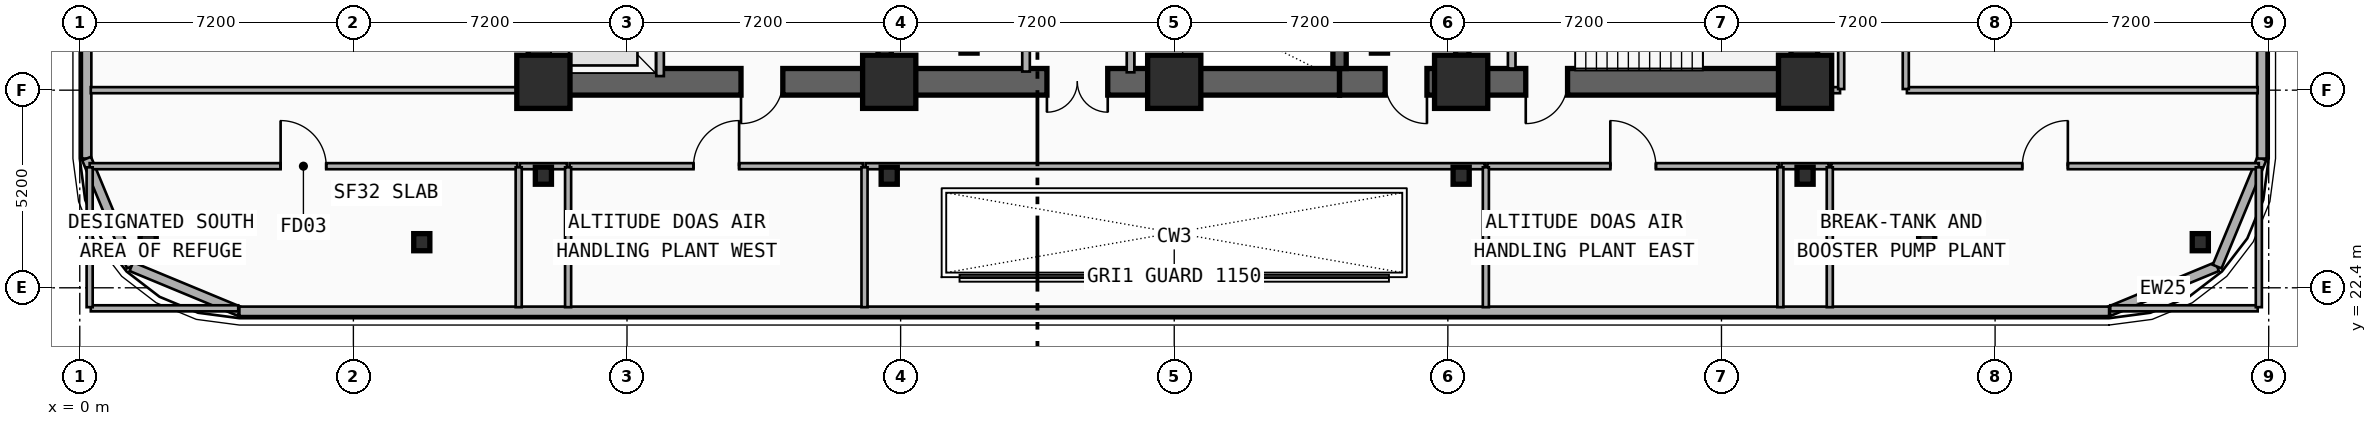
"""IFC4 building model, lengths in metres.
Left out: names, types, materials, properties, quantities, classifications, styles, units other than length and angle.
Written with IfcOpenShell. Run it as: python <this file> out.ifc"""

import sys

from ifc_helpers import new_model, si_unit, direction, frame, frame_2d, origin, origin_2d, place, context, subcontext, project, spatial, rectangle, i_section, extrude, element, fill, save


model = new_model("IFC4")
c1 = context("Model", 3, precision=1e-05, world=origin(), true_north=direction((0.0, 1.0)))
c2 = subcontext(c1, "Body", "Model", "MODEL_VIEW")
j1 = project(units=[si_unit("LENGTHUNIT", "METRE"), si_unit("PLANEANGLEUNIT", "RADIAN")], contexts=[c1])
p1 = place(None, origin())
s1 = spatial("IfcSite", under=j1, at=p1, CompositionType="ELEMENT")
p2 = place(p1, origin())
s2 = spatial("IfcBuilding", under=s1, at=p2, CompositionType="ELEMENT")
p3 = place(p2, frame((0.0, 0.0, 74.5)))
s3 = spatial("IfcBuildingStorey", under=s2, at=p3, CompositionType="ELEMENT", Elevation=74.5)
p4 = place(p3, frame((21.18, 27.82, 0.0), z_axis=(0.0, 0.0, 1.0), x_axis=(-1.0, 0.0, 0.0)))
e1 = element("IfcWall", 1, at=p4, inside=s3, PredefinedType="SHEAR", context=c2, shape_type="SweptSolid", body=[
    extrude(rectangle(XDim=9.03, YDim=0.7, at=frame_2d((4.515, 0.0))), origin(), (0.0, 0.0, 1.0), 4.8),
])
p5 = place(p4, frame((2.68, 0.0, 0.0)))
e2 = element("IfcOpeningElement", 2, at=p5, cuts=e1, PredefinedType="OPENING", context=c2, shape_type="SweptSolid", body=[
    extrude(rectangle(XDim=1.1, YDim=2.15, at=frame_2d((0.55, 1.075))), frame((0.0, 0.36, 0.0), z_axis=(0.0, -1.0, 0.0), x_axis=(1.0, 0.0, 0.0)), (0.0, 0.0, 1.0), 0.72),
])
p6 = place(p3, frame((33.15, 27.82, 0.0), z_axis=(0.0, 0.0, 1.0), x_axis=(-1.0, 0.0, 0.0)))
e3 = element("IfcWall", 3, at=p6, inside=s3, PredefinedType="SHEAR", context=c2, shape_type="SweptSolid", body=[
    extrude(rectangle(XDim=11.97, YDim=0.7, at=frame_2d((5.985, 0.0))), origin(), (0.0, 0.0, 1.0), 4.8),
])
p7 = place(p6, frame((6.1, 0.0, 0.0)))
e4 = element("IfcOpeningElement", 4, at=p7, cuts=e3, PredefinedType="OPENING", context=c2, shape_type="SweptSolid", body=[
    extrude(rectangle(XDim=1.6, YDim=2.2, at=frame_2d((0.8, 1.1))), frame((0.0, 0.36, 0.0), z_axis=(0.0, -1.0, 0.0), x_axis=(1.0, 0.0, 0.0)), (0.0, 0.0, 1.0), 0.72),
])
p8 = place(p3, frame((45.38, 27.82, 0.0), z_axis=(0.0, 0.0, 1.0), x_axis=(-1.0, 0.0, 0.0)))
e5 = element("IfcWall", 5, at=p8, inside=s3, PredefinedType="SHEAR", context=c2, shape_type="SweptSolid", body=[
    extrude(rectangle(XDim=12.23, YDim=0.7, at=frame_2d((6.115, 0.0))), origin(), (0.0, 0.0, 1.0), 4.8),
])
p9 = place(p8, frame((9.93, 0.0, 0.0)))
e6 = element("IfcOpeningElement", 6, at=p9, cuts=e5, PredefinedType="OPENING", context=c2, shape_type="SweptSolid", body=[
    extrude(rectangle(XDim=1.1, YDim=2.15, at=frame_2d((0.55, 1.075))), frame((0.0, 0.36, 0.0), z_axis=(0.0, -1.0, 0.0), x_axis=(1.0, 0.0, 0.0)), (0.0, 0.0, 1.0), 0.72),
])
p10 = place(p8, frame((6.23, 0.0, 0.0)))
e7 = element("IfcOpeningElement", 7, at=p10, cuts=e5, PredefinedType="OPENING", context=c2, shape_type="SweptSolid", body=[
    extrude(rectangle(XDim=1.1, YDim=2.15, at=frame_2d((0.55, 1.075))), frame((0.0, 0.36, 0.0), z_axis=(0.0, -1.0, 0.0), x_axis=(1.0, 0.0, 0.0)), (0.0, 0.0, 1.0), 0.72),
])
for number, where, z_axis, x_axis in (
    (8, (12.15, 28.17, 0.0), (0.0, 0.0, 1.0), (0.0, 1.0, 0.0)),
    (9, (45.38, 28.17, 0.0), (0.0, 0.0, 1.0), (0.0, 1.0, 0.0)),
):
    element("IfcWall", number, at=place(p3, frame(where, z_axis=z_axis, x_axis=x_axis)), inside=s3, PredefinedType="SHEAR", context=c2, shape_type="SweptSolid", body=[
        extrude(rectangle(XDim=8.53, YDim=0.7, at=frame_2d((4.265, 0.0))), origin(), (0.0, 0.0, 1.0), 4.8),
    ])
for number, where, z_axis, x_axis in (
    (10, (21.18, 28.17, 0.0), (0.0, 0.0, 1.0), (0.0, 1.0, 0.0)),
    (11, (33.15, 28.17, 0.0), (0.0, 0.0, 1.0), (0.0, 1.0, 0.0)),
):
    element("IfcWall", number, at=place(p3, frame(where, z_axis=z_axis, x_axis=x_axis)), inside=s3, PredefinedType="SHEAR", context=c2, shape_type="SweptSolid", body=[
        extrude(rectangle(XDim=8.53, YDim=0.35, at=frame_2d((4.265, 0.0))), origin(), (0.0, 0.0, 1.0), 4.8),
    ])
p11 = place(p3, frame((36.38, 28.17, 0.0), z_axis=(0.0, 0.0, 1.0), x_axis=(0.0, 1.0, 0.0)))
e12 = element("IfcWall", 12, at=p11, inside=s3, PredefinedType="SHEAR", context=c2, shape_type="SweptSolid", body=[
    extrude(rectangle(XDim=8.53, YDim=0.35, at=frame_2d((4.265, 0.0))), origin(), (0.0, 0.0, 1.0), 4.8),
])
p12 = place(p11, frame((3.61, 0.0, 0.0)))
e13 = element("IfcOpeningElement", 13, at=p12, cuts=e12, PredefinedType="OPENING", context=c2, shape_type="SweptSolid", body=[
    extrude(rectangle(XDim=1.1, YDim=2.15, at=frame_2d((0.55, 1.075))), frame((0.0, 0.185, 0.0), z_axis=(0.0, -1.0, 0.0), x_axis=(1.0, 0.0, 0.0)), (0.0, 0.0, 1.0), 0.37),
])
for number, where, z_axis, x_axis in (
    (14, (23.4, 28.8, 0.0), (0.0, 0.0, 1.0), (1.0, 0.0, 0.0)),
    (15, (34.2, 28.8, 0.0), (0.0, 0.0, 1.0), (1.0, 0.0, 0.0)),
):
    element("IfcColumn", number, at=place(p3, frame(where, z_axis=z_axis, x_axis=x_axis)), inside=s3, PredefinedType="COLUMN", context=c2, shape_type="SweptSolid", body=[
        extrude(i_section(OverallWidth=0.424, OverallDepth=0.45, WebThickness=0.041, FlangeThickness=0.065, FilletRadius=0.015, at=origin_2d()), origin(), (0.0, 0.0, 1.0), 4.8),
    ])
for number, where, z_axis, x_axis in (
    (16, (12.2, 27.82, 0.0), (0.0, 0.0, 1.0), (1.0, 0.0, 0.0)),
    (17, (21.3, 27.82, 0.0), (0.0, 0.0, 1.0), (1.0, 0.0, 0.0)),
    (18, (28.8, 27.82, 0.0), (0.0, 0.0, 1.0), (1.0, 0.0, 0.0)),
    (19, (36.35, 27.82, 0.0), (0.0, 0.0, 1.0), (1.0, 0.0, 0.0)),
    (20, (45.4, 27.82, 0.0), (0.0, 0.0, 1.0), (1.0, 0.0, 0.0)),
):
    element("IfcColumn", number, at=place(p3, frame(where, z_axis=z_axis, x_axis=x_axis)), inside=s3, PredefinedType="COLUMN", context=c2, shape_type="SweptSolid", body=[
        extrude(rectangle(XDim=1.4, YDim=1.4, at=origin_2d()), origin(), (0.0, 0.0, 1.0), 4.8),
    ])
for number, where, z_axis, x_axis in (
    (21, (12.2, 25.35, 0.0), (0.0, 0.0, 1.0), (1.0, 0.0, 0.0)),
    (22, (21.3, 25.35, 0.0), (0.0, 0.0, 1.0), (1.0, 0.0, 0.0)),
    (23, (36.35, 25.35, 0.0), (0.0, 0.0, 1.0), (1.0, 0.0, 0.0)),
    (24, (45.4, 25.35, 0.0), (0.0, 0.0, 1.0), (1.0, 0.0, 0.0)),
    (25, (9.0, 23.6, 0.0), (0.0, 0.0, 1.0), (1.0, 0.0, 0.0)),
    (26, (48.6, 23.6, 0.0), (0.0, 0.0, 1.0), (1.0, 0.0, 0.0)),
    (27, (1.8, 23.6, 0.0), (0.0, 0.0, 1.0), (1.0, 0.0, 0.0)),
    (28, (55.8, 23.6, 0.0), (0.0, 0.0, 1.0), (1.0, 0.0, 0.0)),
):
    element("IfcColumn", number, at=place(p3, frame(where, z_axis=z_axis, x_axis=x_axis)), inside=s3, PredefinedType="COLUMN", context=c2, shape_type="SweptSolid", body=[
        extrude(i_section(OverallWidth=0.424, OverallDepth=0.45, WebThickness=0.041, FlangeThickness=0.065, FilletRadius=0.015, at=origin_2d()), origin(), (0.0, 0.0, 1.0), 4.8),
    ])
p13 = place(p3, frame((56.243, 22.958, 0.0), z_axis=(0.0, 0.0, 1.0), x_axis=(-0.923882414032, -0.382676475685, 0.0)))
e29 = element("IfcWall", 29, at=p13, inside=s3, PredefinedType="SOLIDWALL", context=c2, shape_type="SweptSolid", body=[
    extrude(rectangle(XDim=3.077, YDim=0.25, at=frame_2d((1.539, 0.0))), origin(), (0.0, 0.0, 1.0), 3.96),
])
p14 = place(p3, frame((57.42, 25.8, 0.0), z_axis=(0.0, 0.0, 1.0), x_axis=(-0.382636798336, -0.92389884758, 0.0)))
e30 = element("IfcWall", 30, at=p14, inside=s3, PredefinedType="SOLIDWALL", context=c2, shape_type="SweptSolid", body=[
    extrude(rectangle(XDim=3.077, YDim=0.25, at=frame_2d((1.538, 0.0))), origin(), (0.0, 0.0, 1.0), 4.48),
])
for number, where, z_axis, x_axis in (
    (31, (57.42, 41.0, 0.0), (0.0, 0.0, 1.0), (0.0, -1.0, 0.0)),
    (32, (0.18, 25.8, 0.0), (0.0, 0.0, 1.0), (0.0, 1.0, 0.0)),
):
    element("IfcWall", number, at=place(p3, frame(where, z_axis=z_axis, x_axis=x_axis)), inside=s3, PredefinedType="SOLIDWALL", context=c2, shape_type="SweptSolid", body=[
        extrude(rectangle(XDim=15.2, YDim=0.25, at=frame_2d((7.6, 0.0))), origin(), (0.0, 0.0, 1.0), 4.48),
    ])
p15 = place(p3, frame((1.357, 22.958, 0.0), z_axis=(0.0, 0.0, 1.0), x_axis=(-0.382704529509, 0.923870793506, 0.0)))
e33 = element("IfcWall", 33, at=p15, inside=s3, PredefinedType="SOLIDWALL", context=c2, shape_type="SweptSolid", body=[
    extrude(rectangle(XDim=3.077, YDim=0.25, at=frame_2d((1.538, 0.0))), origin(), (0.0, 0.0, 1.0), 4.48),
])
p16 = place(p3, frame((4.2, 21.78, 0.0), z_axis=(0.0, 0.0, 1.0), x_axis=(-0.923870793506, 0.382704529509, 0.0)))
e34 = element("IfcWall", 34, at=p16, inside=s3, PredefinedType="SOLIDWALL", context=c2, shape_type="SweptSolid", body=[
    extrude(rectangle(XDim=3.077, YDim=0.25, at=frame_2d((1.538, 0.0))), origin(), (0.0, 0.0, 1.0), 3.96),
])
p17 = place(p3, frame((53.4, 21.78, 0.0), z_axis=(0.0, 0.0, 1.0), x_axis=(-1.0, 0.0, 0.0)))
e35 = element("IfcWall", 35, at=p17, inside=s3, PredefinedType="SOLIDWALL", context=c2, shape_type="SweptSolid", body=[
    extrude(rectangle(XDim=49.2, YDim=0.25, at=frame_2d((24.6, 0.0))), origin(), (0.0, 0.0, 1.0), 4.07),
])
p18 = place(p3, frame((15.27, 27.97, 0.0), z_axis=(0.0, 0.0, 1.0), x_axis=(0.0, 1.0, 0.0)))
e36 = element("IfcWall", 36, at=p18, inside=s3, PredefinedType="PARTITIONING", context=c2, shape_type="SweptSolid", body=[
    extrude(rectangle(XDim=2.96, YDim=0.2, at=frame_2d((1.48, 0.0))), origin(), (0.0, 0.0, 1.0), 3.452),
])
p19 = place(p18, frame((0.93, 0.0, 0.0)))
e37 = element("IfcOpeningElement", 37, at=p19, cuts=e36, PredefinedType="OPENING", context=c2, shape_type="SweptSolid", body=[
    extrude(rectangle(XDim=1.1, YDim=2.15, at=frame_2d((0.55, 1.075))), frame((0.0, 0.11, 0.0), z_axis=(0.0, -1.0, 0.0), x_axis=(1.0, 0.0, 0.0)), (0.0, 0.0, 1.0), 0.22),
])
p20 = place(p3, frame((27.65, 28.07, 0.0), z_axis=(0.0, 0.0, 1.0), x_axis=(0.0, 1.0, 0.0)))
e38 = element("IfcWall", 38, at=p20, inside=s3, PredefinedType="PARTITIONING", context=c2, shape_type="SweptSolid", body=[
    extrude(rectangle(XDim=2.58, YDim=0.2, at=frame_2d((1.29, 0.0))), origin(), (0.0, 0.0, 1.0), 3.452),
])
p21 = place(p3, frame((37.68, 28.17, 0.0), z_axis=(0.0, 0.0, 1.0), x_axis=(0.0, 1.0, 0.0)))
e39 = element("IfcWall", 39, at=p21, inside=s3, PredefinedType="PARTITIONING", context=c2, shape_type="SweptSolid", body=[
    extrude(rectangle(XDim=3.08, YDim=0.2, at=frame_2d((1.54, 0.0))), origin(), (0.0, 0.0, 1.0), 3.86),
])
p22 = place(p3, frame((24.9, 28.09, 0.0), z_axis=(0.0, 0.0, 1.0), x_axis=(0.0, 1.0, 0.0)))
e40 = element("IfcWall", 40, at=p22, inside=s3, PredefinedType="PARTITIONING", context=c2, shape_type="SweptSolid", body=[
    extrude(rectangle(XDim=2.82, YDim=0.2, at=frame_2d((1.41, 0.0))), origin(), (0.0, 0.0, 1.0), 3.86),
])
p23 = place(p22, frame((1.201, 0.0, 0.0)))
e41 = element("IfcOpeningElement", 41, at=p23, cuts=e40, PredefinedType="OPENING", context=c2, shape_type="SweptSolid", body=[
    extrude(rectangle(XDim=1.2, YDim=2.15, at=frame_2d((0.6, 1.075))), frame((0.0, 0.11, 0.0), z_axis=(0.0, -1.0, 0.0), x_axis=(1.0, 0.0, 0.0)), (0.0, 0.0, 1.0), 0.22),
])
p24 = place(p3, frame((0.26, 25.6, 0.0), z_axis=(0.0, 0.0, 1.0), x_axis=(1.0, 0.0, 0.0)))
e42 = element("IfcWall", 42, at=p24, inside=s3, PredefinedType="PARTITIONING", context=c2, shape_type="SweptSolid", body=[
    extrude(rectangle(XDim=11.25, YDim=0.16, at=frame_2d((5.625, 0.0))), origin(), (0.0, 0.0, 1.0), 3.81),
])
p25 = place(p24, frame((5.025, 0.0, 0.0)))
e43 = element("IfcOpeningElement", 43, at=p25, cuts=e42, PredefinedType="OPENING", context=c2, shape_type="SweptSolid", body=[
    extrude(rectangle(XDim=1.2, YDim=2.15, at=frame_2d((0.6, 1.075))), frame((0.0, 0.09, 0.0), z_axis=(0.0, -1.0, 0.0), x_axis=(1.0, 0.0, 0.0)), (0.0, 0.0, 1.0), 0.18),
])
p26 = place(p3, frame((12.89, 25.6, 0.0), z_axis=(0.0, 0.0, 1.0), x_axis=(1.0, 0.0, 0.0)))
e44 = element("IfcWall", 44, at=p26, inside=s3, PredefinedType="PARTITIONING", context=c2, shape_type="SweptSolid", body=[
    extrude(rectangle(XDim=7.72, YDim=0.16, at=frame_2d((3.86, 0.0))), origin(), (0.0, 0.0, 1.0), 4.48),
])
p27 = place(p26, frame((3.26, 0.0, 0.0)))
e45 = element("IfcOpeningElement", 45, at=p27, cuts=e44, PredefinedType="OPENING", context=c2, shape_type="SweptSolid", body=[
    extrude(rectangle(XDim=1.2, YDim=2.15, at=frame_2d((0.6, 1.075))), frame((0.0, 0.09, 0.0), z_axis=(0.0, -1.0, 0.0), x_axis=(1.0, 0.0, 0.0)), (0.0, 0.0, 1.0), 0.18),
])
p28 = place(p3, frame((37.04, 25.6, 0.0), z_axis=(0.0, 0.0, 1.0), x_axis=(1.0, 0.0, 0.0)))
e46 = element("IfcWall", 46, at=p28, inside=s3, PredefinedType="PARTITIONING", context=c2, shape_type="SweptSolid", body=[
    extrude(rectangle(XDim=7.67, YDim=0.16, at=frame_2d((3.835, 0.0))), origin(), (0.0, 0.0, 1.0), 4.48),
])
p29 = place(p28, frame((3.235, 0.0, 0.0)))
e47 = element("IfcOpeningElement", 47, at=p29, cuts=e46, PredefinedType="OPENING", context=c2, shape_type="SweptSolid", body=[
    extrude(rectangle(XDim=1.2, YDim=2.15, at=frame_2d((0.6, 1.075))), frame((0.0, 0.09, 0.0), z_axis=(0.0, -1.0, 0.0), x_axis=(1.0, 0.0, 0.0)), (0.0, 0.0, 1.0), 0.18),
])
p30 = place(p3, frame((46.09, 25.6, 0.0), z_axis=(0.0, 0.0, 1.0), x_axis=(1.0, 0.0, 0.0)))
e48 = element("IfcWall", 48, at=p30, inside=s3, PredefinedType="PARTITIONING", context=c2, shape_type="SweptSolid", body=[
    extrude(rectangle(XDim=11.25, YDim=0.16, at=frame_2d((5.625, 0.0))), origin(), (0.0, 0.0, 1.0), 3.81),
])
p31 = place(p30, frame((5.025, 0.0, 0.0)))
e49 = element("IfcOpeningElement", 49, at=p31, cuts=e48, PredefinedType="OPENING", context=c2, shape_type="SweptSolid", body=[
    extrude(rectangle(XDim=1.2, YDim=2.15, at=frame_2d((0.6, 1.075))), frame((0.0, 0.09, 0.0), z_axis=(0.0, -1.0, 0.0), x_axis=(1.0, 0.0, 0.0)), (0.0, 0.0, 1.0), 0.18),
])
p32 = place(p3, frame((11.58, 25.6, 0.0), z_axis=(0.0, 0.0, 1.0), x_axis=(1.0, 0.0, 0.0)))
e50 = element("IfcWall", 50, at=p32, inside=s3, PredefinedType="PARTITIONING", context=c2, shape_type="SweptSolid", body=[
    extrude(rectangle(XDim=1.24, YDim=0.16, at=frame_2d((0.62, 0.0))), origin(), (0.0, 0.0, 1.0), 3.55),
])
p33 = place(p3, frame((20.68, 25.6, 0.0), z_axis=(0.0, 0.0, 1.0), x_axis=(1.0, 0.0, 0.0)))
e51 = element("IfcWall", 51, at=p33, inside=s3, PredefinedType="PARTITIONING", context=c2, shape_type="SweptSolid", body=[
    extrude(rectangle(XDim=16.29, YDim=0.16, at=frame_2d((8.145, 0.0))), origin(), (0.0, 0.0, 1.0), 3.55),
])
p34 = place(p3, frame((44.78, 25.6, 0.0), z_axis=(0.0, 0.0, 1.0), x_axis=(1.0, 0.0, 0.0)))
e52 = element("IfcWall", 52, at=p34, inside=s3, PredefinedType="PARTITIONING", context=c2, shape_type="SweptSolid", body=[
    extrude(rectangle(XDim=1.24, YDim=0.16, at=frame_2d((0.62, 0.0))), origin(), (0.0, 0.0, 1.0), 3.55),
])
p35 = place(p3, frame((0.29, 27.6, 0.0), z_axis=(0.0, 0.0, 1.0), x_axis=(1.0, 0.0, 0.0)))
e53 = element("IfcWall", 53, at=p35, inside=s3, PredefinedType="PARTITIONING", context=c2, shape_type="SweptSolid", body=[
    extrude(rectangle(XDim=11.83, YDim=0.16, at=frame_2d((5.915, 0.0))), origin(), (0.0, 0.0, 1.0), 3.452),
])
p36 = place(p3, frame((45.41, 27.6, 0.0), z_axis=(0.0, 0.0, 1.0), x_axis=(1.0, 0.0, 0.0)))
e54 = element("IfcWall", 54, at=p36, inside=s3, PredefinedType="PARTITIONING", context=c2, shape_type="SweptSolid", body=[
    extrude(rectangle(XDim=0.91, YDim=0.16, at=frame_2d((0.455, 0.0))), origin(), (0.0, 0.0, 1.0), 3.452),
])
p37 = place(p3, frame((48.08, 27.6, 0.0), z_axis=(0.0, 0.0, 1.0), x_axis=(1.0, 0.0, 0.0)))
e55 = element("IfcWall", 55, at=p37, inside=s3, PredefinedType="PARTITIONING", context=c2, shape_type="SweptSolid", body=[
    extrude(rectangle(XDim=9.23, YDim=0.16, at=frame_2d((4.615, 0.0))), origin(), (0.0, 0.0, 1.0), 3.81),
])
for number, where, z_axis, x_axis in (
    (56, (46.35, 27.63, 0.0), (0.0, 0.0, 1.0), (0.0, 1.0, 0.0)),
    (57, (48.05, 27.63, 0.0), (0.0, 0.0, 1.0), (0.0, 1.0, 0.0)),
):
    element("IfcWall", number, at=place(p3, frame(where, z_axis=z_axis, x_axis=x_axis)), inside=s3, PredefinedType="PARTITIONING", context=c2, shape_type="SweptSolid", body=[
        extrude(rectangle(XDim=10.24, YDim=0.16, at=frame_2d((5.12, 0.0))), origin(), (0.0, 0.0, 1.0), 3.96),
    ])
p38 = place(p3, frame((0.29, 21.86, 0.0), z_axis=(0.0, 0.0, 1.0), x_axis=(1.0, 0.0, 0.0)))
e58 = element("IfcWall", 58, at=p38, inside=s3, PredefinedType="PARTITIONING", context=c2, shape_type="SweptSolid", body=[
    extrude(rectangle(XDim=3.88, YDim=0.16, at=frame_2d((1.94, 0.0))), origin(), (0.0, 0.0, 1.0), 3.96),
])
p39 = place(p3, frame((0.26, 21.89, 0.0), z_axis=(0.0, 0.0, 1.0), x_axis=(0.0, 1.0, 0.0)))
e59 = element("IfcWall", 59, at=p39, inside=s3, PredefinedType="PARTITIONING", context=c2, shape_type="SweptSolid", body=[
    extrude(rectangle(XDim=3.68, YDim=0.16, at=frame_2d((1.84, 0.0))), origin(), (0.0, 0.0, 1.0), 4.48),
])
p40 = place(p3, frame((11.55, 21.89, 0.0), z_axis=(0.0, 0.0, 1.0), x_axis=(0.0, 1.0, 0.0)))
e60 = element("IfcWall", 60, at=p40, inside=s3, PredefinedType="PARTITIONING", context=c2, shape_type="SweptSolid", body=[
    extrude(rectangle(XDim=3.68, YDim=0.16, at=frame_2d((1.84, 0.0))), origin(), (0.0, 0.0, 1.0), 3.96),
])
for number, where, z_axis, x_axis in (
    (61, (12.85, 21.89, 0.0), (0.0, 0.0, 1.0), (0.0, 1.0, 0.0)),
    (62, (20.65, 21.89, 0.0), (0.0, 0.0, 1.0), (0.0, 1.0, 0.0)),
    (63, (37.0, 21.89, 0.0), (0.0, 0.0, 1.0), (0.0, 1.0, 0.0)),
    (64, (44.75, 21.89, 0.0), (0.0, 0.0, 1.0), (0.0, 1.0, 0.0)),
):
    element("IfcWall", number, at=place(p3, frame(where, z_axis=z_axis, x_axis=x_axis)), inside=s3, PredefinedType="PARTITIONING", context=c2, shape_type="SweptSolid", body=[
        extrude(rectangle(XDim=3.68, YDim=0.16, at=frame_2d((1.84, 0.0))), origin(), (0.0, 0.0, 1.0), 3.91),
    ])
p41 = place(p3, frame((53.43, 21.86, 0.0), z_axis=(0.0, 0.0, 1.0), x_axis=(1.0, 0.0, 0.0)))
e65 = element("IfcWall", 65, at=p41, inside=s3, PredefinedType="PARTITIONING", context=c2, shape_type="SweptSolid", body=[
    extrude(rectangle(XDim=3.88, YDim=0.16, at=frame_2d((1.94, 0.0))), origin(), (0.0, 0.0, 1.0), 3.96),
])
p42 = place(p3, frame((46.05, 21.89, 0.0), z_axis=(0.0, 0.0, 1.0), x_axis=(0.0, 1.0, 0.0)))
e66 = element("IfcWall", 66, at=p42, inside=s3, PredefinedType="PARTITIONING", context=c2, shape_type="SweptSolid", body=[
    extrude(rectangle(XDim=3.68, YDim=0.16, at=frame_2d((1.84, 0.0))), origin(), (0.0, 0.0, 1.0), 3.96),
])
p43 = place(p3, frame((57.34, 21.89, 0.0), z_axis=(0.0, 0.0, 1.0), x_axis=(0.0, 1.0, 0.0)))
e67 = element("IfcWall", 67, at=p43, inside=s3, PredefinedType="PARTITIONING", context=c2, shape_type="SweptSolid", body=[
    extrude(rectangle(XDim=3.68, YDim=0.16, at=frame_2d((1.84, 0.0))), origin(), (0.0, 0.0, 1.0), 4.48),
])
p44 = place(p5, origin())
e68 = element("IfcDoor", 68, at=p44, inside=s3, OperationType="SINGLE_SWING_RIGHT", PredefinedType="DOOR", context=c2, shape_type="SweptSolid", body=[
    extrude(rectangle(XDim=1.1, YDim=2.15, at=frame_2d((0.55, 1.075))), frame((0.0, 0.025, 0.0), z_axis=(0.0, -1.0, 0.0), x_axis=(1.0, 0.0, 0.0)), (0.0, 0.0, 1.0), 0.05),
])
fill(e2, e68)
p45 = place(p9, origin())
e69 = element("IfcDoor", 69, at=p45, inside=s3, OperationType="SINGLE_SWING_LEFT", PredefinedType="DOOR", context=c2, shape_type="SweptSolid", body=[
    extrude(rectangle(XDim=1.1, YDim=2.15, at=frame_2d((0.55, 1.075))), frame((0.0, 0.025, 0.0), z_axis=(0.0, -1.0, 0.0), x_axis=(1.0, 0.0, 0.0)), (0.0, 0.0, 1.0), 0.05),
])
fill(e6, e69)
p46 = place(p10, origin())
e70 = element("IfcDoor", 70, at=p46, inside=s3, OperationType="SINGLE_SWING_RIGHT", PredefinedType="DOOR", context=c2, shape_type="SweptSolid", body=[
    extrude(rectangle(XDim=1.1, YDim=2.15, at=frame_2d((0.55, 1.075))), frame((0.0, 0.025, 0.0), z_axis=(0.0, -1.0, 0.0), x_axis=(1.0, 0.0, 0.0)), (0.0, 0.0, 1.0), 0.05),
])
fill(e7, e70)
p47 = place(p7, origin())
e71 = element("IfcDoor", 71, at=p47, inside=s3, OperationType="SINGLE_SWING_LEFT", PredefinedType="DOOR", context=c2, shape_type="SweptSolid", body=[
    extrude(rectangle(XDim=1.6, YDim=2.2, at=frame_2d((0.8, 1.1))), frame((0.0, 0.025, 0.0), z_axis=(0.0, -1.0, 0.0), x_axis=(1.0, 0.0, 0.0)), (0.0, 0.0, 1.0), 0.05),
])
fill(e4, e71)
p48 = place(p25, origin())
e72 = element("IfcDoor", 72, at=p48, inside=s3, OperationType="SINGLE_SWING_LEFT", PredefinedType="DOOR", context=c2, shape_type="SweptSolid", body=[
    extrude(rectangle(XDim=1.2, YDim=2.15, at=frame_2d((0.6, 1.075))), frame((0.0, 0.025, 0.0), z_axis=(0.0, -1.0, 0.0), x_axis=(1.0, 0.0, 0.0)), (0.0, 0.0, 1.0), 0.05),
])
fill(e43, e72)
p49 = place(p27, origin())
e73 = element("IfcDoor", 73, at=p49, inside=s3, OperationType="SINGLE_SWING_RIGHT", PredefinedType="DOOR", context=c2, shape_type="SweptSolid", body=[
    extrude(rectangle(XDim=1.2, YDim=2.15, at=frame_2d((0.6, 1.075))), frame((0.0, 0.025, 0.0), z_axis=(0.0, -1.0, 0.0), x_axis=(1.0, 0.0, 0.0)), (0.0, 0.0, 1.0), 0.05),
])
fill(e45, e73)
p50 = place(p29, origin())
e74 = element("IfcDoor", 74, at=p50, inside=s3, OperationType="SINGLE_SWING_LEFT", PredefinedType="DOOR", context=c2, shape_type="SweptSolid", body=[
    extrude(rectangle(XDim=1.2, YDim=2.15, at=frame_2d((0.6, 1.075))), frame((0.0, 0.025, 0.0), z_axis=(0.0, -1.0, 0.0), x_axis=(1.0, 0.0, 0.0)), (0.0, 0.0, 1.0), 0.05),
])
fill(e47, e74)
p51 = place(p31, origin())
e75 = element("IfcDoor", 75, at=p51, inside=s3, OperationType="SINGLE_SWING_RIGHT", PredefinedType="DOOR", context=c2, shape_type="SweptSolid", body=[
    extrude(rectangle(XDim=1.2, YDim=2.15, at=frame_2d((0.6, 1.075))), frame((0.0, 0.025, 0.0), z_axis=(0.0, -1.0, 0.0), x_axis=(1.0, 0.0, 0.0)), (0.0, 0.0, 1.0), 0.05),
])
fill(e49, e75)
save(model, sys.argv[1])
